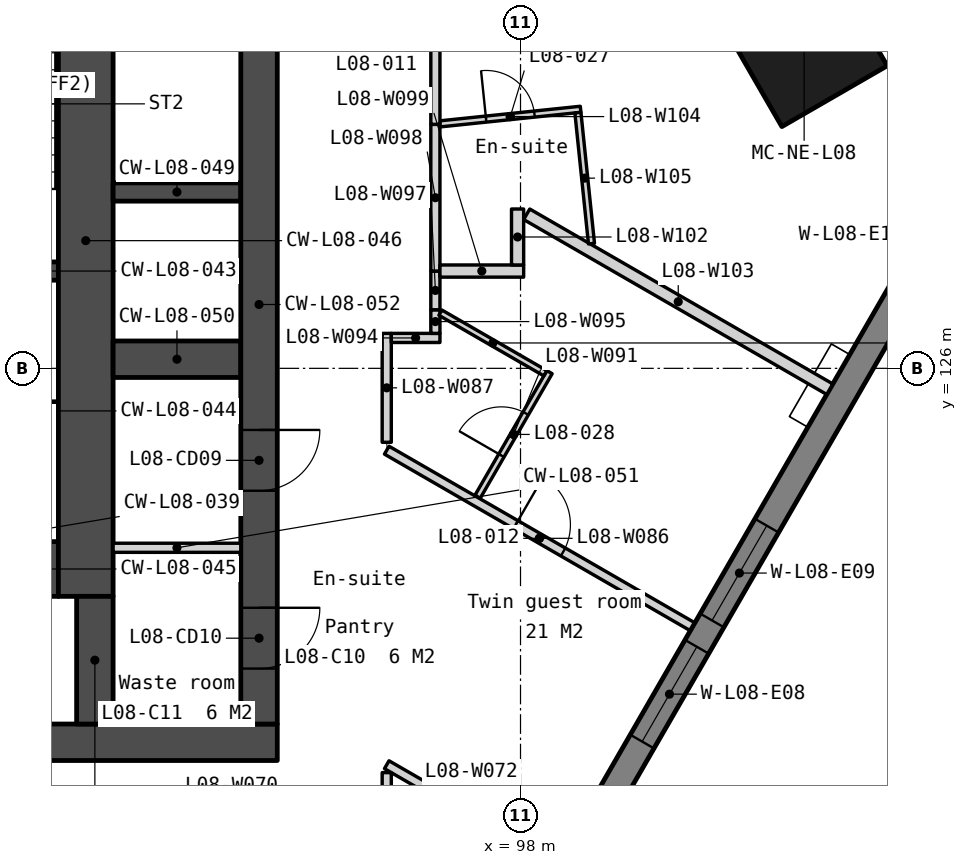
"""IFC4 building model, lengths in metres.
Left out: names, types, materials, properties, quantities, classifications, styles, units other than length and angle.
Written with IfcOpenShell. Run it as: python <this file> out.ifc"""

import sys

from ifc_helpers import new_model, si_unit, direction, frame, frame_2d, origin, origin_2d, place, context, subcontext, project, spatial, polyline, rectangle, outline, extrude, element, fill, save


model = new_model("IFC4")
c1 = context("Model", 3, precision=1e-05, world=origin(), true_north=direction((0.0, 1.0)))
c2 = subcontext(c1, "Body", "Model", "MODEL_VIEW")
j1 = project(units=[si_unit("LENGTHUNIT", "METRE"), si_unit("PLANEANGLEUNIT", "RADIAN")], contexts=[c1])
p1 = place(None, origin())
s1 = spatial("IfcSite", under=j1, at=p1, CompositionType="ELEMENT")
p2 = place(p1, origin())
s2 = spatial("IfcBuilding", under=s1, at=p2, CompositionType="ELEMENT")
p3 = place(p2, frame((0.0, 0.0, 42.0)))
s3 = spatial("IfcBuildingStorey", under=s2, at=p3, CompositionType="ELEMENT", Elevation=42.0)
p4 = place(p3, frame((102.664, 131.342, 0.0), z_axis=(0.0, 0.0, 1.0), x_axis=(-0.5, 0.866025403784, 0.0)))
e1 = element("IfcColumn", 1, at=p4, inside=s3, PredefinedType="COLUMN", context=c2, shape_type="SweptSolid", body=[
    extrude(rectangle(XDim=2.0, YDim=2.0, at=origin_2d()), origin(), (0.0, 0.0, 1.0), 3.5),
])
p5 = place(p3, frame((66.0, 119.85, 0.0), z_axis=(0.0, 0.0, 1.0), x_axis=(1.0, 0.0, 0.0)))
e2 = element("IfcWall", 2, at=p5, inside=s3, PredefinedType="SOLIDWALL", context=c2, shape_type="SweptSolid", body=[
    extrude(rectangle(XDim=28.0, YDim=0.6, at=frame_2d((14.0, 0.0))), origin(), (0.0, 0.0, 1.0), 3.35),
])
p6 = place(p5, frame((6.825, 0.0, 0.0)))
e3 = element("IfcOpeningElement", 3, at=p6, cuts=e2, PredefinedType="OPENING", context=c2, shape_type="SweptSolid", body=[
    extrude(rectangle(XDim=1.8, YDim=2.1, at=frame_2d((0.9, 1.05))), frame((0.0, 0.31, 0.0), z_axis=(0.0, -1.0, 0.0), x_axis=(1.0, 0.0, 0.0)), (0.0, 0.0, 1.0), 0.62),
])
p7 = place(p5, frame((15.85, 0.0, 0.0)))
e4 = element("IfcOpeningElement", 4, at=p7, cuts=e2, PredefinedType="OPENING", context=c2, shape_type="SweptSolid", body=[
    extrude(rectangle(XDim=1.5, YDim=2.1, at=frame_2d((0.75, 1.05))), frame((0.0, 0.31, 0.0), z_axis=(0.0, -1.0, 0.0), x_axis=(1.0, 0.0, 0.0)), (0.0, 0.0, 1.0), 0.62),
])
p8 = place(p5, frame((19.375, 0.0, 0.0)))
e5 = element("IfcOpeningElement", 5, at=p8, cuts=e2, PredefinedType="OPENING", context=c2, shape_type="SweptSolid", body=[
    extrude(rectangle(XDim=1.8, YDim=2.1, at=frame_2d((0.9, 1.05))), frame((0.0, 0.31, 0.0), z_axis=(0.0, -1.0, 0.0), x_axis=(1.0, 0.0, 0.0)), (0.0, 0.0, 1.0), 0.62),
])
p9 = place(p5, frame((4.425, 0.0, 0.0)))
e6 = element("IfcOpeningElement", 6, at=p9, cuts=e2, PredefinedType="OPENING", context=c2, shape_type="SweptSolid", body=[
    extrude(rectangle(XDim=1.0, YDim=2.1, at=frame_2d((0.5, 1.05))), frame((0.0, 0.31, 0.0), z_axis=(0.0, -1.0, 0.0), x_axis=(1.0, 0.0, 0.0)), (0.0, 0.0, 1.0), 0.62),
])
p10 = place(p5, frame((9.783, 0.0, 0.0)))
e7 = element("IfcOpeningElement", 7, at=p10, cuts=e2, PredefinedType="OPENING", context=c2, shape_type="SweptSolid", body=[
    extrude(rectangle(XDim=1.0, YDim=2.1, at=frame_2d((0.5, 1.05))), frame((0.0, 0.31, 0.0), z_axis=(0.0, -1.0, 0.0), x_axis=(1.0, 0.0, 0.0)), (0.0, 0.0, 1.0), 0.62),
])
p11 = place(p5, frame((11.525, 0.0, 0.0)))
e8 = element("IfcOpeningElement", 8, at=p11, cuts=e2, PredefinedType="OPENING", context=c2, shape_type="SweptSolid", body=[
    extrude(rectangle(XDim=1.0, YDim=2.1, at=frame_2d((0.5, 1.05))), frame((0.0, 0.31, 0.0), z_axis=(0.0, -1.0, 0.0), x_axis=(1.0, 0.0, 0.0)), (0.0, 0.0, 1.0), 0.62),
])
p12 = place(p5, frame((13.658, 0.0, 0.0)))
e9 = element("IfcOpeningElement", 9, at=p12, cuts=e2, PredefinedType="OPENING", context=c2, shape_type="SweptSolid", body=[
    extrude(rectangle(XDim=1.0, YDim=2.1, at=frame_2d((0.5, 1.05))), frame((0.0, 0.31, 0.0), z_axis=(0.0, -1.0, 0.0), x_axis=(1.0, 0.0, 0.0)), (0.0, 0.0, 1.0), 0.62),
])
p13 = place(p5, frame((22.575, 0.0, 0.0)))
e10 = element("IfcOpeningElement", 10, at=p13, cuts=e2, PredefinedType="OPENING", context=c2, shape_type="SweptSolid", body=[
    extrude(rectangle(XDim=1.0, YDim=2.1, at=frame_2d((0.5, 1.05))), frame((0.0, 0.31, 0.0), z_axis=(0.0, -1.0, 0.0), x_axis=(1.0, 0.0, 0.0)), (0.0, 0.0, 1.0), 0.62),
])
for number, where, z_axis, x_axis in (
    (11, (87.85, 127.6, 0.0), (0.0, 0.0, 1.0), (1.0, 0.0, 0.0)),
    (12, (87.85, 125.3, 0.0), (0.0, 0.0, 1.0), (1.0, 0.0, 0.0)),
):
    element("IfcWall", number, at=place(p3, frame(where, z_axis=z_axis, x_axis=x_axis)), inside=s3, PredefinedType="SOLIDWALL", context=c2, shape_type="SweptSolid", body=[
        extrude(rectangle(XDim=2.55, YDim=0.3, at=frame_2d((1.275, 0.0))), origin(), (0.0, 0.0, 1.0), 3.35),
    ])
p14 = place(p3, frame((87.85, 122.7, 0.0), z_axis=(0.0, 0.0, 1.0), x_axis=(1.0, 0.0, 0.0)))
e13 = element("IfcWall", 13, at=p14, inside=s3, PredefinedType="SOLIDWALL", context=c2, shape_type="SweptSolid", body=[
    extrude(rectangle(XDim=2.55, YDim=0.9, at=frame_2d((1.275, 0.0))), origin(), (0.0, 0.0, 1.0), 3.35),
])
p15 = place(p3, frame((90.85, 133.95, 0.0), z_axis=(0.0, 0.0, 1.0), x_axis=(0.0, -1.0, 0.0)))
e14 = element("IfcWall", 14, at=p15, inside=s3, PredefinedType="SOLIDWALL", context=c2, shape_type="SweptSolid", body=[
    extrude(rectangle(XDim=11.7, YDim=0.9, at=frame_2d((5.85, 0.0))), origin(), (0.0, 0.0, 1.0), 3.35),
])
p16 = place(p3, frame((91.0, 122.25, 0.0), z_axis=(0.0, 0.0, 1.0), x_axis=(0.0, -1.0, 0.0)))
e15 = element("IfcWall", 15, at=p16, inside=s3, PredefinedType="SOLIDWALL", context=c2, shape_type="SweptSolid", body=[
    extrude(rectangle(XDim=2.1, YDim=0.6, at=frame_2d((1.05, 0.0))), origin(), (0.0, 0.0, 1.0), 3.35),
])
p17 = place(p3, frame((91.3, 128.9, 0.0), z_axis=(0.0, 0.0, 1.0), x_axis=(1.0, 0.0, 0.0)))
e16 = element("IfcWall", 16, at=p17, inside=s3, PredefinedType="SOLIDWALL", context=c2, shape_type="SweptSolid", body=[
    extrude(rectangle(XDim=2.1, YDim=0.3, at=frame_2d((1.05, 0.0))), origin(), (0.0, 0.0, 1.0), 3.35),
])
p18 = place(p3, frame((91.3, 126.15, 0.0), z_axis=(0.0, 0.0, 1.0), x_axis=(1.0, 0.0, 0.0)))
e17 = element("IfcWall", 17, at=p18, inside=s3, PredefinedType="SOLIDWALL", context=c2, shape_type="SweptSolid", body=[
    extrude(rectangle(XDim=2.1, YDim=0.6, at=frame_2d((1.05, 0.0))), origin(), (0.0, 0.0, 1.0), 3.35),
])
p19 = place(p3, frame((91.3, 123.049, 0.0), z_axis=(0.0, 0.0, 1.0), x_axis=(1.0, 0.0, 0.0)))
e18 = element("IfcWall", 18, at=p19, inside=s3, PredefinedType="PARTITIONING", context=c2, shape_type="SweptSolid", body=[
    extrude(rectangle(XDim=2.1, YDim=0.15, at=frame_2d((1.05, 0.0))), origin(), (0.0, 0.0, 1.0), 3.35),
])
p20 = place(p3, frame((93.7, 133.95, 0.0), z_axis=(0.0, 0.0, 1.0), x_axis=(0.0, -1.0, 0.0)))
e19 = element("IfcWall", 19, at=p20, inside=s3, PredefinedType="SOLIDWALL", context=c2, shape_type="SweptSolid", body=[
    extrude(rectangle(XDim=13.8, YDim=0.6, at=frame_2d((6.9, 0.0))), origin(), (0.0, 0.0, 1.0), 3.35),
])
p21 = place(p20, frame((0.6, 0.0, 0.0)))
e20 = element("IfcOpeningElement", 20, at=p21, cuts=e19, PredefinedType="OPENING", context=c2, shape_type="SweptSolid", body=[
    extrude(rectangle(XDim=1.1, YDim=2.1, at=frame_2d((0.55, 1.05))), frame((0.0, 0.31, 0.0), z_axis=(0.0, -1.0, 0.0), x_axis=(1.0, 0.0, 0.0)), (0.0, 0.0, 1.0), 0.62),
])
p22 = place(p20, frame((8.963, 0.0, 0.0)))
e21 = element("IfcOpeningElement", 21, at=p22, cuts=e19, PredefinedType="OPENING", context=c2, shape_type="SweptSolid", body=[
    extrude(rectangle(XDim=1.0, YDim=2.1, at=frame_2d((0.5, 1.05))), frame((0.0, 0.31, 0.0), z_axis=(0.0, -1.0, 0.0), x_axis=(1.0, 0.0, 0.0)), (0.0, 0.0, 1.0), 0.62),
])
p23 = place(p20, frame((11.888, 0.0, 0.0)))
e22 = element("IfcOpeningElement", 22, at=p23, cuts=e19, PredefinedType="OPENING", context=c2, shape_type="SweptSolid", body=[
    extrude(rectangle(XDim=1.0, YDim=2.1, at=frame_2d((0.5, 1.05))), frame((0.0, 0.31, 0.0), z_axis=(0.0, -1.0, 0.0), x_axis=(1.0, 0.0, 0.0)), (0.0, 0.0, 1.0), 0.62),
])
p24 = place(p3, frame((0.0, 0.0, -0.15)))
e23 = element("IfcWall", 23, at=p24, inside=s3, PredefinedType="SOLIDWALL", context=c2, shape_type="SweptSolid", body=[
    extrude(outline(polyline([(105.7, 129.284), (105.31, 129.509), (105.18, 129.284), (102.14, 134.55), (102.4, 134.55), (102.4, 135.0), (105.7, 129.284)])), origin(), (0.0, 0.0, 1.0), 3.5),
])
p25 = place(p3, frame((83.105, 90.599, -0.15), z_axis=(0.0, 0.0, 1.0), x_axis=(0.499999201451, 0.866025864826, 0.0)))
e24 = element("IfcWall", 24, at=p25, inside=s3, PredefinedType="SOLIDWALL", context=c2, shape_type="SweptSolid", body=[
    extrude(outline(polyline([(44.8, 0.0), (44.8, 3.5), (0.0, 3.5), (0.0, 0.0), (44.8, 0.0)])), frame((0.0, 0.225, 0.0), z_axis=(0.0, -1.0, 0.0), x_axis=(1.0, 0.0, 0.0)), (0.0, 0.0, 1.0), 0.45),
])
p26 = place(p25, frame((0.786, 0.0, 1.05)))
e25 = element("IfcOpeningElement", 25, at=p26, cuts=e24, PredefinedType="OPENING", context=c2, shape_type="SweptSolid", body=[
    extrude(rectangle(XDim=1.2, YDim=1.5, at=frame_2d((0.6, 0.75))), frame((0.0, 0.235, 0.0), z_axis=(0.0, -1.0, 0.0), x_axis=(1.0, 0.0, 0.0)), (0.0, 0.0, 1.0), 0.47),
])
p27 = place(p25, frame((6.91, 0.0, 1.05)))
e26 = element("IfcOpeningElement", 26, at=p27, cuts=e24, PredefinedType="OPENING", context=c2, shape_type="SweptSolid", body=[
    extrude(rectangle(XDim=1.8, YDim=1.5, at=frame_2d((0.9, 0.75))), frame((0.0, 0.235, 0.0), z_axis=(0.0, -1.0, 0.0), x_axis=(1.0, 0.0, 0.0)), (0.0, 0.0, 1.0), 0.47),
])
p28 = place(p25, frame((9.21, 0.0, 1.05)))
e27 = element("IfcOpeningElement", 27, at=p28, cuts=e24, PredefinedType="OPENING", context=c2, shape_type="SweptSolid", body=[
    extrude(rectangle(XDim=1.8, YDim=1.5, at=frame_2d((0.9, 0.75))), frame((0.0, 0.235, 0.0), z_axis=(0.0, -1.0, 0.0), x_axis=(1.0, 0.0, 0.0)), (0.0, 0.0, 1.0), 0.47),
])
p29 = place(p25, frame((15.87, 0.0, 1.05)))
e28 = element("IfcOpeningElement", 28, at=p29, cuts=e24, PredefinedType="OPENING", context=c2, shape_type="SweptSolid", body=[
    extrude(rectangle(XDim=1.8, YDim=1.5, at=frame_2d((0.9, 0.75))), frame((0.0, 0.235, 0.0), z_axis=(0.0, -1.0, 0.0), x_axis=(1.0, 0.0, 0.0)), (0.0, 0.0, 1.0), 0.47),
])
p30 = place(p25, frame((18.17, 0.0, 1.05)))
e29 = element("IfcOpeningElement", 29, at=p30, cuts=e24, PredefinedType="OPENING", context=c2, shape_type="SweptSolid", body=[
    extrude(rectangle(XDim=1.8, YDim=1.5, at=frame_2d((0.9, 0.75))), frame((0.0, 0.235, 0.0), z_axis=(0.0, -1.0, 0.0), x_axis=(1.0, 0.0, 0.0)), (0.0, 0.0, 1.0), 0.47),
])
p31 = place(p25, frame((24.83, 0.0, 1.05)))
e30 = element("IfcOpeningElement", 30, at=p31, cuts=e24, PredefinedType="OPENING", context=c2, shape_type="SweptSolid", body=[
    extrude(rectangle(XDim=1.8, YDim=1.5, at=frame_2d((0.9, 0.75))), frame((0.0, 0.235, 0.0), z_axis=(0.0, -1.0, 0.0), x_axis=(1.0, 0.0, 0.0)), (0.0, 0.0, 1.0), 0.47),
])
p32 = place(p25, frame((27.13, 0.0, 1.05)))
e31 = element("IfcOpeningElement", 31, at=p32, cuts=e24, PredefinedType="OPENING", context=c2, shape_type="SweptSolid", body=[
    extrude(rectangle(XDim=1.8, YDim=1.5, at=frame_2d((0.9, 0.75))), frame((0.0, 0.235, 0.0), z_axis=(0.0, -1.0, 0.0), x_axis=(1.0, 0.0, 0.0)), (0.0, 0.0, 1.0), 0.47),
])
p33 = place(p25, frame((33.79, 0.0, 1.05)))
e32 = element("IfcOpeningElement", 32, at=p33, cuts=e24, PredefinedType="OPENING", context=c2, shape_type="SweptSolid", body=[
    extrude(rectangle(XDim=1.8, YDim=1.5, at=frame_2d((0.9, 0.75))), frame((0.0, 0.235, 0.0), z_axis=(0.0, -1.0, 0.0), x_axis=(1.0, 0.0, 0.0)), (0.0, 0.0, 1.0), 0.47),
])
p34 = place(p25, frame((36.09, 0.0, 1.05)))
e33 = element("IfcOpeningElement", 33, at=p34, cuts=e24, PredefinedType="OPENING", context=c2, shape_type="SweptSolid", body=[
    extrude(rectangle(XDim=1.8, YDim=1.5, at=frame_2d((0.9, 0.75))), frame((0.0, 0.235, 0.0), z_axis=(0.0, -1.0, 0.0), x_axis=(1.0, 0.0, 0.0)), (0.0, 0.0, 1.0), 0.47),
])
p35 = place(p25, frame((42.814, 0.0, 1.05)))
e34 = element("IfcOpeningElement", 34, at=p35, cuts=e24, PredefinedType="OPENING", context=c2, shape_type="SweptSolid", body=[
    extrude(rectangle(XDim=1.2, YDim=1.5, at=frame_2d((0.6, 0.75))), frame((0.0, 0.235, 0.0), z_axis=(0.0, -1.0, 0.0), x_axis=(1.0, 0.0, 0.0)), (0.0, 0.0, 1.0), 0.47),
])
p36 = place(p3, frame((0.0, 0.0, -0.15)))
e35 = element("IfcWall", 35, at=p36, inside=s3, PredefinedType="SOLIDWALL", context=c2, shape_type="SweptSolid", body=[
    extrude(outline(polyline([(105.7, 129.284), (107.218, 134.139), (102.4, 135.0), (105.7, 129.284)])), origin(), (0.0, 0.0, 1.0), 3.5),
])
p37 = place(p3, frame((95.8, 119.481, 0.0), z_axis=(0.0, 0.0, 1.0), x_axis=(0.866017228228, -0.500014160211, 0.0)))
e36 = element("IfcWall", 36, at=p37, inside=s3, PredefinedType="PARTITIONING", context=c2, shape_type="SweptSolid", body=[
    extrude(rectangle(XDim=3.212, YDim=0.15, at=frame_2d((1.606, 0.0))), origin(), (0.0, 0.0, 1.0), 3.35),
])
p38 = place(p3, frame((95.8, 117.825, 0.0), z_axis=(0.0, 0.0, 1.0), x_axis=(0.0, 1.0, 0.0)))
e37 = element("IfcWall", 37, at=p38, inside=s3, PredefinedType="PARTITIONING", context=c2, shape_type="SweptSolid", body=[
    extrude(rectangle(XDim=1.526, YDim=0.15, at=frame_2d((0.763, 0.0))), origin(), (0.0, 0.0, 1.0), 3.35),
])
p39 = place(p3, frame((95.8, 124.654, 0.0), z_axis=(0.0, 0.0, 1.0), x_axis=(0.86602431599, -0.50000188411, 0.0)))
e38 = element("IfcWall", 38, at=p39, inside=s3, PredefinedType="PARTITIONING", context=c2, shape_type="SweptSolid", body=[
    extrude(rectangle(XDim=5.798, YDim=0.15, at=frame_2d((2.899, 0.0))), origin(), (0.0, 0.0, 1.0), 3.35),
])
p40 = place(p39, frame((2.449, 0.0, 0.0)))
e39 = element("IfcOpeningElement", 39, at=p40, cuts=e38, PredefinedType="OPENING", context=c2, shape_type="SweptSolid", body=[
    extrude(rectangle(XDim=0.9, YDim=2.1, at=frame_2d((0.45, 1.05))), frame((0.0, 0.085, 0.0), z_axis=(0.0, -1.0, 0.0), x_axis=(1.0, 0.0, 0.0)), (0.0, 0.0, 1.0), 0.17),
])
p41 = place(p3, frame((95.8, 124.784, 0.0), z_axis=(0.0, 0.0, 1.0), x_axis=(0.0, 1.0, 0.0)))
e40 = element("IfcWall", 40, at=p41, inside=s3, PredefinedType="PARTITIONING", context=c2, shape_type="SweptSolid", body=[
    extrude(rectangle(XDim=1.791, YDim=0.15, at=frame_2d((0.896, 0.0))), origin(), (0.0, 0.0, 1.0), 3.35),
])
p42 = place(p3, frame((97.295, 123.889, 0.0), z_axis=(0.0, 0.0, 1.0), x_axis=(0.500002418582, 0.866024007411, 0.0)))
e41 = element("IfcWall", 41, at=p42, inside=s3, PredefinedType="PARTITIONING", context=c2, shape_type="SweptSolid", body=[
    extrude(rectangle(XDim=2.365, YDim=0.1, at=frame_2d((1.183, 0.0))), origin(), (0.0, 0.0, 1.0), 3.35),
])
p43 = place(p42, frame((0.782, 0.0, 0.0)))
e42 = element("IfcOpeningElement", 42, at=p43, cuts=e41, PredefinedType="OPENING", context=c2, shape_type="SweptSolid", body=[
    extrude(rectangle(XDim=0.8, YDim=2.1, at=frame_2d((0.4, 1.05))), frame((0.0, 0.06, 0.0), z_axis=(0.0, -1.0, 0.0), x_axis=(1.0, 0.0, 0.0)), (0.0, 0.0, 1.0), 0.12),
])
p44 = place(p3, frame((95.875, 126.5, 0.0), z_axis=(0.0, 0.0, 1.0), x_axis=(1.0, 0.0, 0.0)))
e43 = element("IfcWall", 43, at=p44, inside=s3, PredefinedType="PARTITIONING", context=c2, shape_type="SweptSolid", body=[
    extrude(rectangle(XDim=0.8, YDim=0.15, at=frame_2d((0.4, 0.0))), origin(), (0.0, 0.0, 1.0), 3.35),
])
p45 = place(p3, frame((96.6, 126.575, 0.0), z_axis=(0.0, 0.0, 1.0), x_axis=(0.0, 1.0, 0.0)))
e44 = element("IfcWall", 44, at=p45, inside=s3, PredefinedType="PARTITIONING", context=c2, shape_type="SweptSolid", body=[
    extrude(rectangle(XDim=0.388, YDim=0.15, at=frame_2d((0.194, 0.0))), origin(), (0.0, 0.0, 1.0), 3.35),
])
p46 = place(p3, frame((96.682, 126.916, 0.0), z_axis=(0.0, 0.0, 1.0), x_axis=(0.866026522829, -0.499998061752, 0.0)))
e45 = element("IfcWall", 45, at=p46, inside=s3, PredefinedType="PARTITIONING", context=c2, shape_type="SweptSolid", body=[
    extrude(rectangle(XDim=1.994, YDim=0.1, at=frame_2d((0.997, 0.0))), origin(), (0.0, 0.0, 1.0), 3.35),
])
p47 = place(p3, frame((96.6, 126.963, 0.0), z_axis=(0.0, 0.0, 1.0), x_axis=(0.0, 1.0, 0.0)))
e46 = element("IfcWall", 46, at=p47, inside=s3, PredefinedType="PARTITIONING", context=c2, shape_type="SweptSolid", body=[
    extrude(rectangle(XDim=0.637, YDim=0.15, at=frame_2d((0.318, 0.0))), origin(), (0.0, 0.0, 1.0), 3.35),
])
p48 = place(p3, frame((96.6, 127.6, 0.0), z_axis=(0.0, 0.0, 1.0), x_axis=(0.0, 1.0, 0.0)))
e47 = element("IfcWall", 47, at=p48, inside=s3, PredefinedType="PARTITIONING", context=c2, shape_type="SweptSolid", body=[
    extrude(rectangle(XDim=2.413, YDim=0.15, at=frame_2d((1.207, 0.0))), origin(), (0.0, 0.0, 1.0), 3.35),
])
p49 = place(p3, frame((96.675, 127.6, 0.0), z_axis=(0.0, 0.0, 1.0), x_axis=(1.0, 0.0, 0.0)))
e48 = element("IfcWall", 48, at=p49, inside=s3, PredefinedType="PARTITIONING", context=c2, shape_type="SweptSolid", body=[
    extrude(rectangle(XDim=1.377, YDim=0.2, at=frame_2d((0.688, 0.0))), origin(), (0.0, 0.0, 1.0), 2.938),
])
p50 = place(p3, frame((97.952, 127.7, 0.0), z_axis=(0.0, 0.0, 1.0), x_axis=(0.0, 1.0, 0.0)))
e49 = element("IfcWall", 49, at=p50, inside=s3, PredefinedType="PARTITIONING", context=c2, shape_type="SweptSolid", body=[
    extrude(rectangle(XDim=0.921, YDim=0.2, at=frame_2d((0.46, 0.0))), origin(), (0.0, 0.0, 1.0), 3.35),
])
p51 = place(p3, frame((98.102, 128.534, 0.0), z_axis=(0.0, 0.0, 1.0), x_axis=(0.866083868743, -0.499898722045, 0.0)))
e50 = element("IfcWall", 50, at=p51, inside=s3, PredefinedType="PARTITIONING", context=c2, shape_type="SweptSolid", body=[
    extrude(rectangle(XDim=5.755, YDim=0.2, at=frame_2d((2.877, 0.0))), origin(), (0.0, 0.0, 1.0), 3.35),
])
p52 = place(p3, frame((96.675, 130.021, 0.0), z_axis=(0.0, 0.0, 1.0), x_axis=(0.994663603819, 0.103171290762, 0.0)))
e51 = element("IfcWall", 51, at=p52, inside=s3, PredefinedType="PARTITIONING", context=c2, shape_type="SweptSolid", body=[
    extrude(rectangle(XDim=2.326, YDim=0.1, at=frame_2d((1.163, 0.0))), origin(), (0.0, 0.0, 1.0), 3.35),
])
p53 = place(p52, frame((0.763, 0.0, 0.0)))
e52 = element("IfcOpeningElement", 52, at=p53, cuts=e51, PredefinedType="OPENING", context=c2, shape_type="SweptSolid", body=[
    extrude(rectangle(XDim=0.8, YDim=2.1, at=frame_2d((0.4, 1.05))), frame((0.0, 0.06, 0.0), z_axis=(0.0, -1.0, 0.0), x_axis=(1.0, 0.0, 0.0)), (0.0, 0.0, 1.0), 0.12),
])
p54 = place(p3, frame((98.944, 130.206, 0.0), z_axis=(0.0, 0.0, 1.0), x_axis=(0.103118312291, -0.994669097575, 0.0)))
e53 = element("IfcWall", 53, at=p54, inside=s3, PredefinedType="PARTITIONING", context=c2, shape_type="SweptSolid", body=[
    extrude(rectangle(XDim=2.166, YDim=0.1, at=frame_2d((1.083, 0.0))), origin(), (0.0, 0.0, 1.0), 3.35),
])
p55 = place(p3, frame((96.6, 130.013, 0.0), z_axis=(0.0, 0.0, 1.0), x_axis=(0.0, 1.0, 0.0)))
e54 = element("IfcWall", 54, at=p55, inside=s3, PredefinedType="PARTITIONING", context=c2, shape_type="SweptSolid", body=[
    extrude(rectangle(XDim=3.912, YDim=0.15, at=frame_2d((1.956, 0.0))), origin(), (0.0, 0.0, 1.0), 3.35),
])
p56 = place(p55, frame((1.506, 0.0, 0.0)))
e55 = element("IfcOpeningElement", 55, at=p56, cuts=e54, PredefinedType="OPENING", context=c2, shape_type="SweptSolid", body=[
    extrude(rectangle(XDim=0.9, YDim=2.1, at=frame_2d((0.45, 1.05))), frame((0.0, 0.085, 0.0), z_axis=(0.0, -1.0, 0.0), x_axis=(1.0, 0.0, 0.0)), (0.0, 0.0, 1.0), 0.17),
])
p57 = place(p22, origin())
e56 = element("IfcDoor", 56, at=p57, inside=s3, OperationType="SINGLE_SWING_LEFT", PredefinedType="DOOR", context=c2, shape_type="SweptSolid", body=[
    extrude(rectangle(XDim=1.0, YDim=2.1, at=frame_2d((0.5, 1.05))), frame((0.0, 0.025, 0.0), z_axis=(0.0, -1.0, 0.0), x_axis=(1.0, 0.0, 0.0)), (0.0, 0.0, 1.0), 0.05),
])
fill(e21, e56)
p58 = place(p23, origin())
e57 = element("IfcDoor", 57, at=p58, inside=s3, OperationType="SINGLE_SWING_LEFT", PredefinedType="DOOR", context=c2, shape_type="SweptSolid", body=[
    extrude(rectangle(XDim=1.0, YDim=2.1, at=frame_2d((0.5, 1.05))), frame((0.0, 0.025, 0.0), z_axis=(0.0, -1.0, 0.0), x_axis=(1.0, 0.0, 0.0)), (0.0, 0.0, 1.0), 0.05),
])
fill(e22, e57)
p59 = place(p33, origin())
e58 = element("IfcWindow", 58, at=p59, inside=s3, PartitioningType="SINGLE_PANEL", PredefinedType="WINDOW", context=c2, shape_type="SweptSolid", body=[
    extrude(rectangle(XDim=1.8, YDim=1.5, at=frame_2d((0.9, 0.75))), frame((0.0, 0.03, 0.0), z_axis=(0.0, -1.0, 0.0), x_axis=(1.0, 0.0, 0.0)), (0.0, 0.0, 1.0), 0.06),
])
fill(e32, e58)
p60 = place(p34, origin())
e59 = element("IfcWindow", 59, at=p60, inside=s3, PartitioningType="SINGLE_PANEL", PredefinedType="WINDOW", context=c2, shape_type="SweptSolid", body=[
    extrude(rectangle(XDim=1.8, YDim=1.5, at=frame_2d((0.9, 0.75))), frame((0.0, 0.03, 0.0), z_axis=(0.0, -1.0, 0.0), x_axis=(1.0, 0.0, 0.0)), (0.0, 0.0, 1.0), 0.06),
])
fill(e33, e59)
p61 = place(p40, origin())
e60 = element("IfcDoor", 60, at=p61, inside=s3, OperationType="SINGLE_SWING_LEFT", PredefinedType="DOOR", context=c2, shape_type="SweptSolid", body=[
    extrude(rectangle(XDim=0.9, YDim=2.1, at=frame_2d((0.45, 1.05))), frame((0.0, 0.025, 0.0), z_axis=(0.0, -1.0, 0.0), x_axis=(1.0, 0.0, 0.0)), (0.0, 0.0, 1.0), 0.05),
])
fill(e39, e60)
p62 = place(p53, origin())
e61 = element("IfcDoor", 61, at=p62, inside=s3, OperationType="SINGLE_SWING_LEFT", PredefinedType="DOOR", context=c2, shape_type="SweptSolid", body=[
    extrude(rectangle(XDim=0.8, YDim=2.1, at=frame_2d((0.4, 1.05))), frame((0.0, 0.025, 0.0), z_axis=(0.0, -1.0, 0.0), x_axis=(1.0, 0.0, 0.0)), (0.0, 0.0, 1.0), 0.05),
])
fill(e52, e61)
p63 = place(p43, origin())
e62 = element("IfcDoor", 62, at=p63, inside=s3, OperationType="SINGLE_SWING_LEFT", PredefinedType="DOOR", context=c2, shape_type="SweptSolid", body=[
    extrude(rectangle(XDim=0.8, YDim=2.1, at=frame_2d((0.4, 1.05))), frame((0.0, 0.025, 0.0), z_axis=(0.0, -1.0, 0.0), x_axis=(1.0, 0.0, 0.0)), (0.0, 0.0, 1.0), 0.05),
])
fill(e42, e62)
save(model, sys.argv[1])
